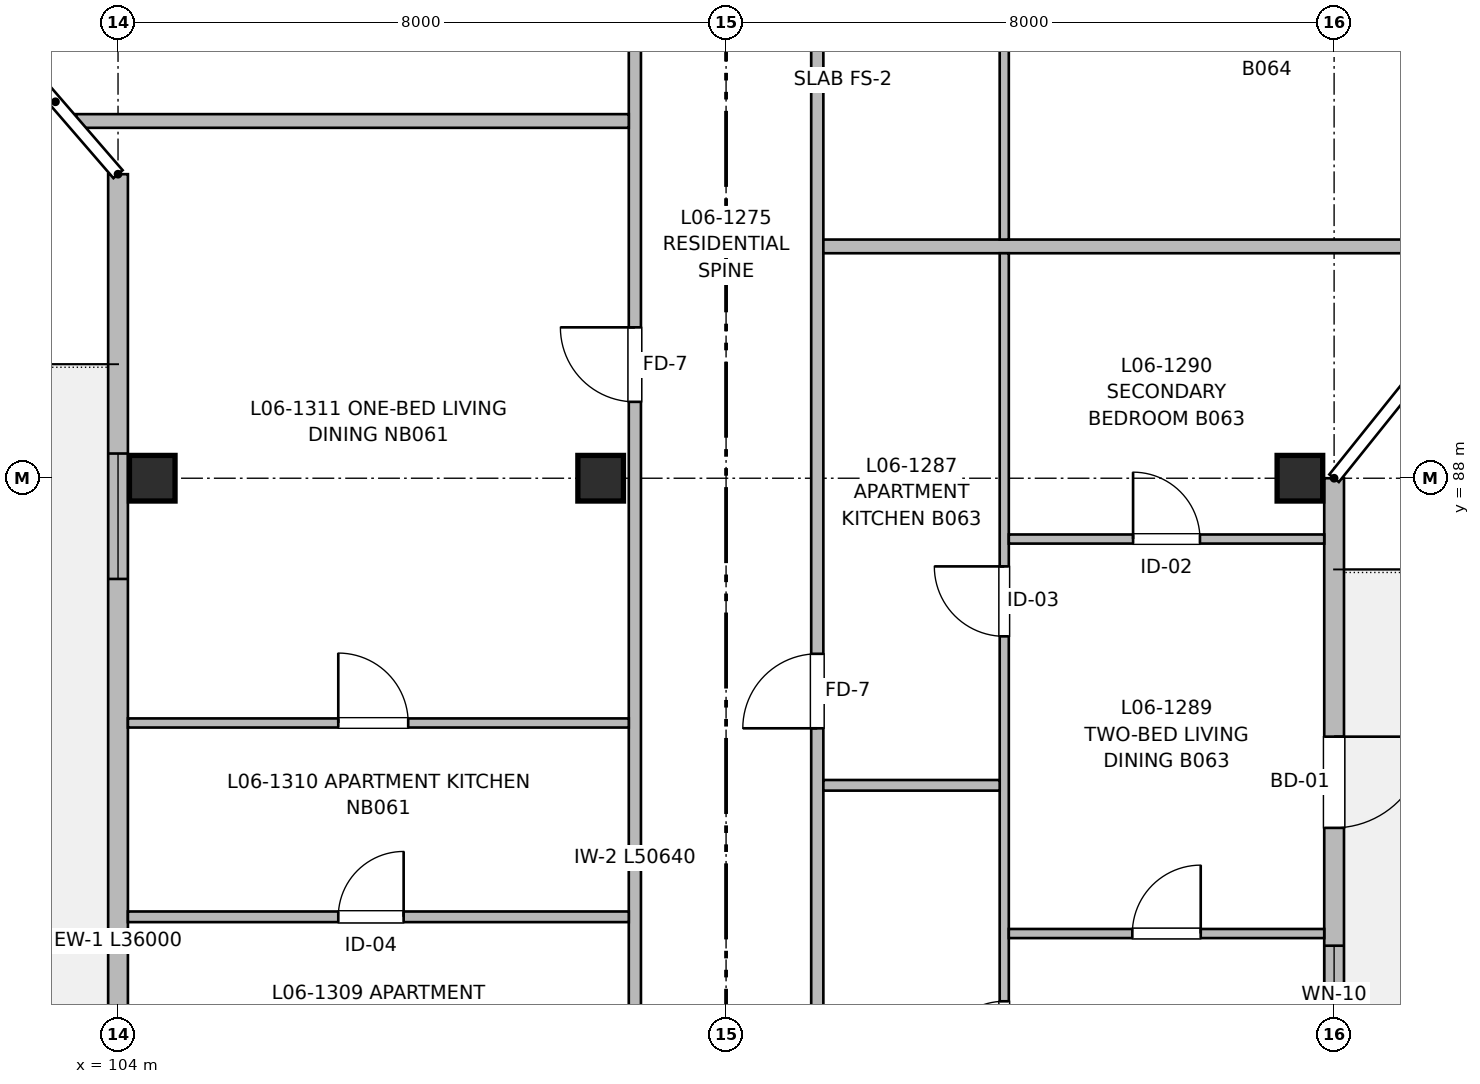
"""IFC4 building model, lengths in metres.
Left out: names, types, materials, properties, quantities, classifications, styles, units other than length and angle.
Written with IfcOpenShell. Run it as: python <this file> out.ifc"""

import sys

from ifc_helpers import new_model, si_unit, direction, frame, frame_2d, origin, origin_2d, place, context, subcontext, project, spatial, rectangle, extrude, element, fill, save


model = new_model("IFC4")
c1 = context("Model", 3, precision=1e-05, world=origin(), true_north=direction((0.0, 1.0)))
c2 = subcontext(c1, "Body", "Model", "MODEL_VIEW")
j1 = project(units=[si_unit("LENGTHUNIT", "METRE"), si_unit("PLANEANGLEUNIT", "RADIAN")], contexts=[c1])
p1 = place(None, origin())
s1 = spatial("IfcSite", under=j1, at=p1, CompositionType="ELEMENT")
p2 = place(p1, origin())
s2 = spatial("IfcBuilding", under=s1, at=p2, CompositionType="ELEMENT")
p3 = place(p2, frame((0.0, 0.0, 20.16)))
s3 = spatial("IfcBuildingStorey", under=s2, at=p3, CompositionType="ELEMENT", Elevation=20.16)
for number, where, z_axis, x_axis in (
    (1, (104.45, 88.0, 0.0), (0.0, 0.0, 1.0), (1.0, 0.0, 0.0)),
    (2, (110.35, 88.0, 0.0), (0.0, 0.0, 1.0), (1.0, 0.0, 0.0)),
    (3, (119.55, 88.0, 0.0), (0.0, 0.0, 1.0), (1.0, 0.0, 0.0)),
):
    element("IfcColumn", number, at=place(p3, frame(where, z_axis=z_axis, x_axis=x_axis)), inside=s3, PredefinedType="COLUMN", context=c2, shape_type="SweptSolid", body=[
        extrude(rectangle(XDim=0.6, YDim=0.6, at=origin_2d()), origin(), (0.0, 0.0, 1.0), 3.2),
    ])
p4 = place(p3, frame((120.0, 88.0, 0.0), z_axis=(0.0, 0.0, 1.0), x_axis=(0.0, -1.0, 0.0)))
e4 = element("IfcWall", 4, at=p4, inside=s3, PredefinedType="SOLIDWALL", context=c2, shape_type="SweptSolid", body=[
    extrude(rectangle(XDim=32.0, YDim=0.26, at=frame_2d((16.0, 0.0))), origin(), (0.0, 0.0, 1.0), 2.98),
])
p5 = place(p4, frame((3.4, 0.0, 0.0)))
e5 = element("IfcOpeningElement", 5, at=p5, cuts=e4, PredefinedType="OPENING", context=c2, shape_type="SweptSolid", body=[
    extrude(rectangle(XDim=1.2, YDim=2.2, at=frame_2d((0.6, 1.1))), frame((0.0, 0.14, 0.0), z_axis=(0.0, -1.0, 0.0), x_axis=(1.0, 0.0, 0.0)), (0.0, 0.0, 1.0), 0.28),
])
p6 = place(p4, frame((6.15, 0.0, 0.82)))
e6 = element("IfcOpeningElement", 6, at=p6, cuts=e4, PredefinedType="OPENING", context=c2, shape_type="SweptSolid", body=[
    extrude(rectangle(XDim=1.3, YDim=1.4, at=frame_2d((0.65, 0.7))), frame((0.0, 0.14, 0.0), z_axis=(0.0, -1.0, 0.0), x_axis=(1.0, 0.0, 0.0)), (0.0, 0.0, 1.0), 0.28),
])
p7 = place(p4, frame((11.1, 0.0, 0.72)))
e7 = element("IfcOpeningElement", 7, at=p7, cuts=e4, PredefinedType="OPENING", context=c2, shape_type="SweptSolid", body=[
    extrude(rectangle(XDim=1.8, YDim=1.5, at=frame_2d((0.9, 0.75))), frame((0.0, 0.14, 0.0), z_axis=(0.0, -1.0, 0.0), x_axis=(1.0, 0.0, 0.0)), (0.0, 0.0, 1.0), 0.28),
])
p8 = place(p4, frame((19.0, 0.0, 0.72)))
e8 = element("IfcOpeningElement", 8, at=p8, cuts=e4, PredefinedType="OPENING", context=c2, shape_type="SweptSolid", body=[
    extrude(rectangle(XDim=2.0, YDim=1.5, at=frame_2d((1.0, 0.75))), frame((0.0, 0.14, 0.0), z_axis=(0.0, -1.0, 0.0), x_axis=(1.0, 0.0, 0.0)), (0.0, 0.0, 1.0), 0.28),
])
p9 = place(p4, frame((27.175, 0.0, 0.77)))
e9 = element("IfcOpeningElement", 9, at=p9, cuts=e4, PredefinedType="OPENING", context=c2, shape_type="SweptSolid", body=[
    extrude(rectangle(XDim=1.65, YDim=1.45, at=frame_2d((0.825, 0.725))), frame((0.0, 0.14, 0.0), z_axis=(0.0, -1.0, 0.0), x_axis=(1.0, 0.0, 0.0)), (0.0, 0.0, 1.0), 0.28),
])
p10 = place(p4, frame((22.051, 0.0, 0.82)))
e10 = element("IfcOpeningElement", 10, at=p10, cuts=e4, PredefinedType="OPENING", context=c2, shape_type="SweptSolid", body=[
    extrude(rectangle(XDim=1.5, YDim=1.4, at=frame_2d((0.75, 0.7))), frame((0.0, 0.14, 0.0), z_axis=(0.0, -1.0, 0.0), x_axis=(1.0, 0.0, 0.0)), (0.0, 0.0, 1.0), 0.28),
])
p11 = place(p3, frame((104.0, 56.0, 0.0), z_axis=(0.0, 0.0, 1.0), x_axis=(0.0, 1.0, 0.0)))
e11 = element("IfcWall", 11, at=p11, inside=s3, PredefinedType="SOLIDWALL", context=c2, shape_type="SweptSolid", body=[
    extrude(rectangle(XDim=36.0, YDim=0.26, at=frame_2d((18.0, 0.0))), origin(), (0.0, 0.0, 1.0), 2.98),
])
p12 = place(p11, frame((3.9, 0.0, 0.0)))
e12 = element("IfcOpeningElement", 12, at=p12, cuts=e11, PredefinedType="OPENING", context=c2, shape_type="SweptSolid", body=[
    extrude(rectangle(XDim=1.2, YDim=2.2, at=frame_2d((0.6, 1.1))), frame((0.0, 0.14, 0.0), z_axis=(0.0, -1.0, 0.0), x_axis=(1.0, 0.0, 0.0)), (0.0, 0.0, 1.0), 0.28),
])
p13 = place(p11, frame((5.8, 0.0, 0.82)))
e13 = element("IfcOpeningElement", 13, at=p13, cuts=e11, PredefinedType="OPENING", context=c2, shape_type="SweptSolid", body=[
    extrude(rectangle(XDim=1.3, YDim=1.4, at=frame_2d((0.65, 0.7))), frame((0.0, 0.14, 0.0), z_axis=(0.0, -1.0, 0.0), x_axis=(1.0, 0.0, 0.0)), (0.0, 0.0, 1.0), 0.28),
])
p14 = place(p11, frame((12.6, 0.0, 0.72)))
e14 = element("IfcOpeningElement", 14, at=p14, cuts=e11, PredefinedType="OPENING", context=c2, shape_type="SweptSolid", body=[
    extrude(rectangle(XDim=1.8, YDim=1.5, at=frame_2d((0.9, 0.75))), frame((0.0, 0.14, 0.0), z_axis=(0.0, -1.0, 0.0), x_axis=(1.0, 0.0, 0.0)), (0.0, 0.0, 1.0), 0.28),
])
p15 = place(p11, frame((19.15, 0.0, 0.72)))
e15 = element("IfcOpeningElement", 15, at=p15, cuts=e11, PredefinedType="OPENING", context=c2, shape_type="SweptSolid", body=[
    extrude(rectangle(XDim=2.0, YDim=1.5, at=frame_2d((1.0, 0.75))), frame((0.0, 0.14, 0.0), z_axis=(0.0, -1.0, 0.0), x_axis=(1.0, 0.0, 0.0)), (0.0, 0.0, 1.0), 0.28),
])
p16 = place(p11, frame((30.675, 0.0, 0.77)))
e16 = element("IfcOpeningElement", 16, at=p16, cuts=e11, PredefinedType="OPENING", context=c2, shape_type="SweptSolid", body=[
    extrude(rectangle(XDim=1.65, YDim=1.45, at=frame_2d((0.825, 0.725))), frame((0.0, 0.14, 0.0), z_axis=(0.0, -1.0, 0.0), x_axis=(1.0, 0.0, 0.0)), (0.0, 0.0, 1.0), 0.28),
])
p17 = place(p3, frame((110.8, 56.16, 0.0), z_axis=(0.0, 0.0, 1.0), x_axis=(0.0, 1.0, 0.0)))
e17 = element("IfcWall", 17, at=p17, inside=s3, PredefinedType="PARTITIONING", context=c2, shape_type="SweptSolid", body=[
    extrude(rectangle(XDim=50.64, YDim=0.16, at=frame_2d((25.32, 0.0))), origin(), (0.0, 0.0, 1.0), 2.935),
])
p18 = place(p17, frame((12.84, 0.0, 0.0)))
e18 = element("IfcOpeningElement", 18, at=p18, cuts=e17, PredefinedType="OPENING", context=c2, shape_type="SweptSolid", body=[
    extrude(rectangle(XDim=1.1, YDim=2.15, at=frame_2d((0.55, 1.075))), frame((0.0, 0.09, 0.0), z_axis=(0.0, -1.0, 0.0), x_axis=(1.0, 0.0, 0.0)), (0.0, 0.0, 1.0), 0.18),
])
p19 = place(p17, frame((19.24, 0.0, 0.0)))
e19 = element("IfcOpeningElement", 19, at=p19, cuts=e17, PredefinedType="OPENING", context=c2, shape_type="SweptSolid", body=[
    extrude(rectangle(XDim=1.6, YDim=2.15, at=frame_2d((0.8, 1.075))), frame((0.0, 0.09, 0.0), z_axis=(0.0, -1.0, 0.0), x_axis=(1.0, 0.0, 0.0)), (0.0, 0.0, 1.0), 0.18),
])
p20 = place(p17, frame((1.8, 0.0, 0.0)))
e20 = element("IfcOpeningElement", 20, at=p20, cuts=e17, PredefinedType="OPENING", context=c2, shape_type="SweptSolid", body=[
    extrude(rectangle(XDim=0.96, YDim=2.15, at=frame_2d((0.48, 1.075))), frame((0.0, 0.09, 0.0), z_axis=(0.0, -1.0, 0.0), x_axis=(1.0, 0.0, 0.0)), (0.0, 0.0, 1.0), 0.18),
])
p21 = place(p17, frame((32.845, 0.0, 0.0)))
e21 = element("IfcOpeningElement", 21, at=p21, cuts=e17, PredefinedType="OPENING", context=c2, shape_type="SweptSolid", body=[
    extrude(rectangle(XDim=0.98, YDim=2.15, at=frame_2d((0.49, 1.075))), frame((0.0, 0.09, 0.0), z_axis=(0.0, -1.0, 0.0), x_axis=(1.0, 0.0, 0.0)), (0.0, 0.0, 1.0), 0.18),
])
p22 = place(p17, frame((40.655, 0.0, 0.0)))
e22 = element("IfcOpeningElement", 22, at=p22, cuts=e17, PredefinedType="OPENING", context=c2, shape_type="SweptSolid", body=[
    extrude(rectangle(XDim=0.98, YDim=2.15, at=frame_2d((0.49, 1.075))), frame((0.0, 0.09, 0.0), z_axis=(0.0, -1.0, 0.0), x_axis=(1.0, 0.0, 0.0)), (0.0, 0.0, 1.0), 0.18),
])
p23 = place(p3, frame((113.2, 56.16, 0.0), z_axis=(0.0, 0.0, 1.0), x_axis=(0.0, 1.0, 0.0)))
e23 = element("IfcWall", 23, at=p23, inside=s3, PredefinedType="PARTITIONING", context=c2, shape_type="SweptSolid", body=[
    extrude(rectangle(XDim=50.64, YDim=0.16, at=frame_2d((25.32, 0.0))), origin(), (0.0, 0.0, 1.0), 2.935),
])
p24 = place(p23, frame((5.59, 0.0, 0.0)))
e24 = element("IfcOpeningElement", 24, at=p24, cuts=e23, PredefinedType="OPENING", context=c2, shape_type="SweptSolid", body=[
    extrude(rectangle(XDim=0.98, YDim=2.15, at=frame_2d((0.49, 1.075))), frame((0.0, 0.09, 0.0), z_axis=(0.0, -1.0, 0.0), x_axis=(1.0, 0.0, 0.0)), (0.0, 0.0, 1.0), 0.18),
])
p25 = place(p23, frame((16.49, 0.0, 0.0)))
e25 = element("IfcOpeningElement", 25, at=p25, cuts=e23, PredefinedType="OPENING", context=c2, shape_type="SweptSolid", body=[
    extrude(rectangle(XDim=0.98, YDim=2.15, at=frame_2d((0.49, 1.075))), frame((0.0, 0.09, 0.0), z_axis=(0.0, -1.0, 0.0), x_axis=(1.0, 0.0, 0.0)), (0.0, 0.0, 1.0), 0.18),
])
p26 = place(p23, frame((28.55, 0.0, 0.0)))
e26 = element("IfcOpeningElement", 26, at=p26, cuts=e23, PredefinedType="OPENING", context=c2, shape_type="SweptSolid", body=[
    extrude(rectangle(XDim=0.98, YDim=2.15, at=frame_2d((0.49, 1.075))), frame((0.0, 0.09, 0.0), z_axis=(0.0, -1.0, 0.0), x_axis=(1.0, 0.0, 0.0)), (0.0, 0.0, 1.0), 0.18),
])
p27 = place(p23, frame((42.9, 0.0, 0.0)))
e27 = element("IfcOpeningElement", 27, at=p27, cuts=e23, PredefinedType="OPENING", context=c2, shape_type="SweptSolid", body=[
    extrude(rectangle(XDim=0.98, YDim=2.15, at=frame_2d((0.49, 1.075))), frame((0.0, 0.09, 0.0), z_axis=(0.0, -1.0, 0.0), x_axis=(1.0, 0.0, 0.0)), (0.0, 0.0, 1.0), 0.18),
])
p28 = place(p3, frame((113.28, 91.05, 0.0), z_axis=(0.0, 0.0, 1.0), x_axis=(1.0, 0.0, 0.0)))
e28 = element("IfcWall", 28, at=p28, inside=s3, PredefinedType="PARTITIONING", context=c2, shape_type="SweptSolid", body=[
    extrude(rectangle(XDim=9.115, YDim=0.18, at=frame_2d((4.558, 0.0))), origin(), (0.0, 0.0, 1.0), 2.935),
])
p29 = place(p3, frame((115.66, 77.99, 0.0), z_axis=(0.0, 0.0, 1.0), x_axis=(0.0, 1.0, 0.0)))
e29 = element("IfcWall", 29, at=p29, inside=s3, PredefinedType="PARTITIONING", context=c2, shape_type="SweptSolid", body=[
    extrude(rectangle(XDim=12.97, YDim=0.12, at=frame_2d((6.485, 0.0))), origin(), (0.0, 0.0, 1.0), 2.935),
])
p30 = place(p29, frame((2.269, 0.0, 0.0)))
e30 = element("IfcOpeningElement", 30, at=p30, cuts=e29, PredefinedType="OPENING", context=c2, shape_type="SweptSolid", body=[
    extrude(rectangle(XDim=0.86, YDim=2.1, at=frame_2d((0.43, 1.05))), frame((0.0, 0.07, 0.0), z_axis=(0.0, -1.0, 0.0), x_axis=(1.0, 0.0, 0.0)), (0.0, 0.0, 1.0), 0.14),
])
p31 = place(p29, frame((7.93, 0.0, 0.0)))
e31 = element("IfcOpeningElement", 31, at=p31, cuts=e29, PredefinedType="OPENING", context=c2, shape_type="SweptSolid", body=[
    extrude(rectangle(XDim=0.92, YDim=2.1, at=frame_2d((0.46, 1.05))), frame((0.0, 0.07, 0.0), z_axis=(0.0, -1.0, 0.0), x_axis=(1.0, 0.0, 0.0)), (0.0, 0.0, 1.0), 0.14),
])
p32 = place(p3, frame((113.28, 83.96, 0.0), z_axis=(0.0, 0.0, 1.0), x_axis=(1.0, 0.0, 0.0)))
e32 = element("IfcWall", 32, at=p32, inside=s3, PredefinedType="PARTITIONING", context=c2, shape_type="SweptSolid", body=[
    extrude(rectangle(XDim=2.32, YDim=0.14, at=frame_2d((1.16, 0.0))), origin(), (0.0, 0.0, 1.0), 2.935),
])
p33 = place(p3, frame((115.72, 82.01, 0.0), z_axis=(0.0, 0.0, 1.0), x_axis=(1.0, 0.0, 0.0)))
e33 = element("IfcWall", 33, at=p33, inside=s3, PredefinedType="PARTITIONING", context=c2, shape_type="SweptSolid", body=[
    extrude(rectangle(XDim=4.15, YDim=0.12, at=frame_2d((2.075, 0.0))), origin(), (0.0, 0.0, 1.0), 2.935),
])
p34 = place(p33, frame((1.625, 0.0, 0.0)))
e34 = element("IfcOpeningElement", 34, at=p34, cuts=e33, PredefinedType="OPENING", context=c2, shape_type="SweptSolid", body=[
    extrude(rectangle(XDim=0.9, YDim=2.1, at=frame_2d((0.45, 1.05))), frame((0.0, 0.07, 0.0), z_axis=(0.0, -1.0, 0.0), x_axis=(1.0, 0.0, 0.0)), (0.0, 0.0, 1.0), 0.14),
])
p35 = place(p3, frame((115.72, 87.2, 0.0), z_axis=(0.0, 0.0, 1.0), x_axis=(1.0, 0.0, 0.0)))
e35 = element("IfcWall", 35, at=p35, inside=s3, PredefinedType="PARTITIONING", context=c2, shape_type="SweptSolid", body=[
    extrude(rectangle(XDim=4.15, YDim=0.12, at=frame_2d((2.075, 0.0))), origin(), (0.0, 0.0, 1.0), 2.935),
])
p36 = place(p35, frame((1.635, 0.0, 0.0)))
e36 = element("IfcOpeningElement", 36, at=p36, cuts=e35, PredefinedType="OPENING", context=c2, shape_type="SweptSolid", body=[
    extrude(rectangle(XDim=0.88, YDim=2.1, at=frame_2d((0.44, 1.05))), frame((0.0, 0.07, 0.0), z_axis=(0.0, -1.0, 0.0), x_axis=(1.0, 0.0, 0.0)), (0.0, 0.0, 1.0), 0.14),
])
p37 = place(p3, frame((115.66, 91.14, 0.0), z_axis=(0.0, 0.0, 1.0), x_axis=(0.0, 1.0, 0.0)))
e37 = element("IfcWall", 37, at=p37, inside=s3, PredefinedType="PARTITIONING", context=c2, shape_type="SweptSolid", body=[
    extrude(rectangle(XDim=15.58, YDim=0.12, at=frame_2d((7.79, 0.0))), origin(), (0.0, 0.0, 1.0), 2.68),
])
p38 = place(p37, frame((2.725, 0.0, 0.0)))
e38 = element("IfcOpeningElement", 38, at=p38, cuts=e37, PredefinedType="OPENING", context=c2, shape_type="SweptSolid", body=[
    extrude(rectangle(XDim=0.86, YDim=2.1, at=frame_2d((0.43, 1.05))), frame((0.0, 0.07, 0.0), z_axis=(0.0, -1.0, 0.0), x_axis=(1.0, 0.0, 0.0)), (0.0, 0.0, 1.0), 0.14),
])
p39 = place(p37, frame((7.425, 0.0, 0.0)))
e39 = element("IfcOpeningElement", 39, at=p39, cuts=e37, PredefinedType="OPENING", context=c2, shape_type="SweptSolid", body=[
    extrude(rectangle(XDim=0.92, YDim=2.1, at=frame_2d((0.46, 1.05))), frame((0.0, 0.07, 0.0), z_axis=(0.0, -1.0, 0.0), x_axis=(1.0, 0.0, 0.0)), (0.0, 0.0, 1.0), 0.14),
])
p40 = place(p3, frame((103.448, 92.7, 0.0), z_axis=(0.0, 0.0, 1.0), x_axis=(1.0, 0.0, 0.0)))
e40 = element("IfcWall", 40, at=p40, inside=s3, PredefinedType="PARTITIONING", context=c2, shape_type="SweptSolid", body=[
    extrude(rectangle(XDim=7.272, YDim=0.18, at=frame_2d((3.636, 0.0))), origin(), (0.0, 0.0, 1.0), 2.935),
])
p41 = place(p3, frame((104.13, 82.23, 0.0), z_axis=(0.0, 0.0, 1.0), x_axis=(1.0, 0.0, 0.0)))
e41 = element("IfcWall", 41, at=p41, inside=s3, PredefinedType="PARTITIONING", context=c2, shape_type="SweptSolid", body=[
    extrude(rectangle(XDim=6.59, YDim=0.14, at=frame_2d((3.295, 0.0))), origin(), (0.0, 0.0, 1.0), 2.935),
])
p42 = place(p41, frame((2.768, 0.0, 0.0)))
e42 = element("IfcOpeningElement", 42, at=p42, cuts=e41, PredefinedType="OPENING", context=c2, shape_type="SweptSolid", body=[
    extrude(rectangle(XDim=0.86, YDim=2.1, at=frame_2d((0.43, 1.05))), frame((0.0, 0.08, 0.0), z_axis=(0.0, -1.0, 0.0), x_axis=(1.0, 0.0, 0.0)), (0.0, 0.0, 1.0), 0.16),
])
p43 = place(p3, frame((104.13, 84.78, 0.0), z_axis=(0.0, 0.0, 1.0), x_axis=(1.0, 0.0, 0.0)))
e43 = element("IfcWall", 43, at=p43, inside=s3, PredefinedType="PARTITIONING", context=c2, shape_type="SweptSolid", body=[
    extrude(rectangle(XDim=6.59, YDim=0.12, at=frame_2d((3.295, 0.0))), origin(), (0.0, 0.0, 1.0), 2.935),
])
p44 = place(p43, frame((2.768, 0.0, 0.0)))
e44 = element("IfcOpeningElement", 44, at=p44, cuts=e43, PredefinedType="OPENING", context=c2, shape_type="SweptSolid", body=[
    extrude(rectangle(XDim=0.92, YDim=2.1, at=frame_2d((0.46, 1.05))), frame((0.0, 0.07, 0.0), z_axis=(0.0, -1.0, 0.0), x_axis=(1.0, 0.0, 0.0)), (0.0, 0.0, 1.0), 0.14),
])
p45 = place(p5, origin())
e45 = element("IfcDoor", 45, at=p45, inside=s3, OperationType="SINGLE_SWING_LEFT", PredefinedType="DOOR", context=c2, shape_type="SweptSolid", body=[
    extrude(rectangle(XDim=1.2, YDim=2.2, at=frame_2d((0.6, 1.1))), frame((0.0, 0.025, 0.0), z_axis=(0.0, -1.0, 0.0), x_axis=(1.0, 0.0, 0.0)), (0.0, 0.0, 1.0), 0.05),
])
fill(e5, e45)
p46 = place(p6, origin())
e46 = element("IfcWindow", 46, at=p46, inside=s3, PartitioningType="SINGLE_PANEL", PredefinedType="WINDOW", context=c2, shape_type="SweptSolid", body=[
    extrude(rectangle(XDim=1.3, YDim=1.4, at=frame_2d((0.65, 0.7))), frame((0.0, 0.03, 0.0), z_axis=(0.0, -1.0, 0.0), x_axis=(1.0, 0.0, 0.0)), (0.0, 0.0, 1.0), 0.06),
])
fill(e6, e46)
p47 = place(p16, origin())
e47 = element("IfcWindow", 47, at=p47, inside=s3, PartitioningType="SINGLE_PANEL", PredefinedType="WINDOW", context=c2, shape_type="SweptSolid", body=[
    extrude(rectangle(XDim=1.65, YDim=1.45, at=frame_2d((0.825, 0.725))), frame((0.0, 0.03, 0.0), z_axis=(0.0, -1.0, 0.0), x_axis=(1.0, 0.0, 0.0)), (0.0, 0.0, 1.0), 0.06),
])
fill(e16, e47)
p48 = place(p30, origin())
e48 = element("IfcDoor", 48, at=p48, inside=s3, OperationType="SINGLE_SWING_LEFT", PredefinedType="DOOR", context=c2, shape_type="SweptSolid", body=[
    extrude(rectangle(XDim=0.86, YDim=2.1, at=frame_2d((0.43, 1.05))), frame((0.0, 0.025, 0.0), z_axis=(0.0, -1.0, 0.0), x_axis=(1.0, 0.0, 0.0)), (0.0, 0.0, 1.0), 0.05),
])
fill(e30, e48)
p49 = place(p31, origin())
e49 = element("IfcDoor", 49, at=p49, inside=s3, OperationType="SINGLE_SWING_RIGHT", PredefinedType="DOOR", context=c2, shape_type="SweptSolid", body=[
    extrude(rectangle(XDim=0.92, YDim=2.1, at=frame_2d((0.46, 1.05))), frame((0.0, 0.025, 0.0), z_axis=(0.0, -1.0, 0.0), x_axis=(1.0, 0.0, 0.0)), (0.0, 0.0, 1.0), 0.05),
])
fill(e31, e49)
p50 = place(p26, origin())
e50 = element("IfcDoor", 50, at=p50, inside=s3, OperationType="SINGLE_SWING_LEFT", PredefinedType="DOOR", context=c2, shape_type="SweptSolid", body=[
    extrude(rectangle(XDim=0.98, YDim=2.15, at=frame_2d((0.49, 1.075))), frame((0.0, 0.025, 0.0), z_axis=(0.0, -1.0, 0.0), x_axis=(1.0, 0.0, 0.0)), (0.0, 0.0, 1.0), 0.05),
])
fill(e26, e50)
p51 = place(p34, origin())
e51 = element("IfcDoor", 51, at=p51, inside=s3, OperationType="SINGLE_SWING_RIGHT", PredefinedType="DOOR", context=c2, shape_type="SweptSolid", body=[
    extrude(rectangle(XDim=0.9, YDim=2.1, at=frame_2d((0.45, 1.05))), frame((0.0, 0.025, 0.0), z_axis=(0.0, -1.0, 0.0), x_axis=(1.0, 0.0, 0.0)), (0.0, 0.0, 1.0), 0.05),
])
fill(e34, e51)
p52 = place(p36, origin())
e52 = element("IfcDoor", 52, at=p52, inside=s3, OperationType="SINGLE_SWING_LEFT", PredefinedType="DOOR", context=c2, shape_type="SweptSolid", body=[
    extrude(rectangle(XDim=0.88, YDim=2.1, at=frame_2d((0.44, 1.05))), frame((0.0, 0.025, 0.0), z_axis=(0.0, -1.0, 0.0), x_axis=(1.0, 0.0, 0.0)), (0.0, 0.0, 1.0), 0.05),
])
fill(e36, e52)
p53 = place(p42, origin())
e53 = element("IfcDoor", 53, at=p53, inside=s3, OperationType="SINGLE_SWING_RIGHT", PredefinedType="DOOR", context=c2, shape_type="SweptSolid", body=[
    extrude(rectangle(XDim=0.86, YDim=2.1, at=frame_2d((0.43, 1.05))), frame((0.0, 0.025, 0.0), z_axis=(0.0, -1.0, 0.0), x_axis=(1.0, 0.0, 0.0)), (0.0, 0.0, 1.0), 0.05),
])
fill(e42, e53)
p54 = place(p44, origin())
e54 = element("IfcDoor", 54, at=p54, inside=s3, OperationType="SINGLE_SWING_LEFT", PredefinedType="DOOR", context=c2, shape_type="SweptSolid", body=[
    extrude(rectangle(XDim=0.92, YDim=2.1, at=frame_2d((0.46, 1.05))), frame((0.0, 0.025, 0.0), z_axis=(0.0, -1.0, 0.0), x_axis=(1.0, 0.0, 0.0)), (0.0, 0.0, 1.0), 0.05),
])
fill(e44, e54)
p55 = place(p21, origin())
e55 = element("IfcDoor", 55, at=p55, inside=s3, OperationType="SINGLE_SWING_RIGHT", PredefinedType="DOOR", context=c2, shape_type="SweptSolid", body=[
    extrude(rectangle(XDim=0.98, YDim=2.15, at=frame_2d((0.49, 1.075))), frame((0.0, 0.025, 0.0), z_axis=(0.0, -1.0, 0.0), x_axis=(1.0, 0.0, 0.0)), (0.0, 0.0, 1.0), 0.05),
])
fill(e21, e55)
save(model, sys.argv[1])
